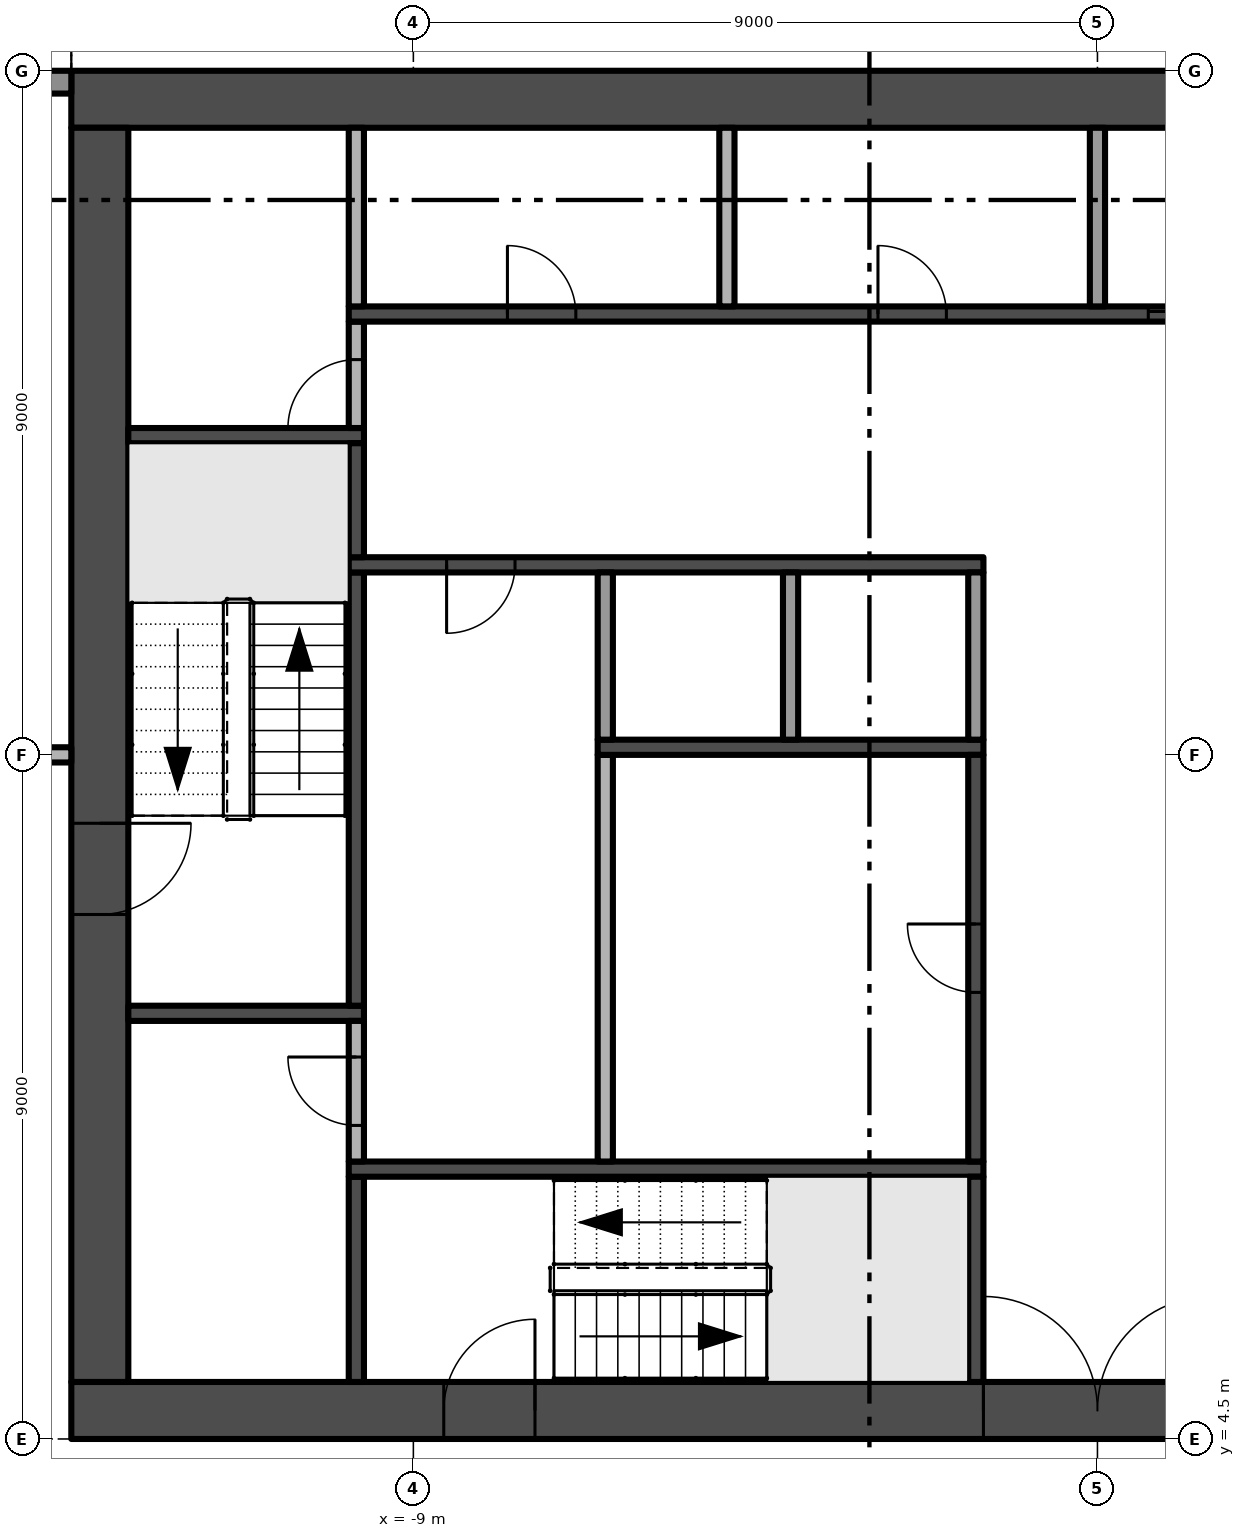
"""IFC4 building model, lengths in metres.
Left out: names, types, materials, properties, quantities, classifications, styles, units other than length and angle.
Written with IfcOpenShell. Run it as: python <this file> out.ifc"""

import sys

from ifc_helpers import new_model, si_unit, direction, frame, frame_2d, origin, place, context, subcontext, project, spatial, rectangle, extrude, element, fill, save


model = new_model("IFC4")
c1 = context("Model", 3, precision=1e-05, world=origin(), true_north=direction((0.0, 1.0)))
c2 = subcontext(c1, "Body", "Model", "MODEL_VIEW")
j1 = project(units=[si_unit("LENGTHUNIT", "METRE"), si_unit("PLANEANGLEUNIT", "RADIAN")], contexts=[c1])
p1 = place(None, origin())
s1 = spatial("IfcSite", under=j1, at=p1, CompositionType="ELEMENT")
p2 = place(p1, origin())
s2 = spatial("IfcBuilding", under=s1, at=p2, CompositionType="ELEMENT")
p3 = place(p2, frame((0.0, 0.0, 144.0)))
s3 = spatial("IfcBuildingStorey", under=s2, at=p3, CompositionType="ELEMENT", Elevation=144.0)
p4 = place(p3, frame((-13.5, 4.875, -0.3), z_axis=(0.0, 0.0, 1.0), x_axis=(1.0, 0.0, 0.0)))
e1 = element("IfcWall", 1, at=p4, inside=s3, PredefinedType="SHEAR", context=c2, shape_type="SweptSolid", body=[
    extrude(rectangle(XDim=27.0, YDim=0.75, at=frame_2d((13.5, 0.0))), origin(), (0.0, 0.0, 1.0), 3.8),
])
p5 = place(p4, frame((12.0, 0.0, 0.3)))
e2 = element("IfcOpeningElement", 2, at=p5, cuts=e1, PredefinedType="OPENING", context=c2, shape_type="SweptSolid", body=[
    extrude(rectangle(XDim=3.0, YDim=2.4, at=frame_2d((1.5, 1.2))), frame((0.0, 0.385, 0.0), z_axis=(0.0, -1.0, 0.0), x_axis=(1.0, 0.0, 0.0)), (0.0, 0.0, 1.0), 0.77),
])
p6 = place(p4, frame((4.9, 0.0, 0.3)))
e3 = element("IfcOpeningElement", 3, at=p6, cuts=e1, PredefinedType="OPENING", context=c2, shape_type="SweptSolid", body=[
    extrude(rectangle(XDim=1.2, YDim=2.2, at=frame_2d((0.6, 1.1))), frame((0.0, 0.385, 0.0), z_axis=(0.0, -1.0, 0.0), x_axis=(1.0, 0.0, 0.0)), (0.0, 0.0, 1.0), 0.77),
])
p7 = place(p4, frame((20.75, 0.0, 0.3)))
e4 = element("IfcOpeningElement", 4, at=p7, cuts=e1, PredefinedType="OPENING", context=c2, shape_type="SweptSolid", body=[
    extrude(rectangle(XDim=1.5, YDim=2.2, at=frame_2d((0.75, 1.1))), frame((0.0, 0.385, 0.0), z_axis=(0.0, -1.0, 0.0), x_axis=(1.0, 0.0, 0.0)), (0.0, 0.0, 1.0), 0.77),
])
p8 = place(p4, frame((17.4, 0.0, 0.3)))
e5 = element("IfcOpeningElement", 5, at=p8, cuts=e1, PredefinedType="OPENING", context=c2, shape_type="SweptSolid", body=[
    extrude(rectangle(XDim=1.2, YDim=2.2, at=frame_2d((0.6, 1.1))), frame((0.0, 0.385, 0.0), z_axis=(0.0, -1.0, 0.0), x_axis=(1.0, 0.0, 0.0)), (0.0, 0.0, 1.0), 0.77),
])
p9 = place(p3, frame((13.5, 22.125, -0.3), z_axis=(0.0, 0.0, 1.0), x_axis=(-1.0, 0.0, 0.0)))
e6 = element("IfcWall", 6, at=p9, inside=s3, PredefinedType="SHEAR", context=c2, shape_type="SweptSolid", body=[
    extrude(rectangle(XDim=27.0, YDim=0.75, at=frame_2d((13.5, 0.0))), origin(), (0.0, 0.0, 1.0), 3.8),
])
p10 = place(p3, frame((-13.125, 21.75, -0.3), z_axis=(0.0, 0.0, 1.0), x_axis=(0.0, -1.0, 0.0)))
e7 = element("IfcWall", 7, at=p10, inside=s3, PredefinedType="SHEAR", context=c2, shape_type="SweptSolid", body=[
    extrude(rectangle(XDim=16.5, YDim=0.75, at=frame_2d((8.25, 0.0))), origin(), (0.0, 0.0, 1.0), 3.8),
])
p11 = place(p10, frame((9.15, 0.0, 0.3)))
e8 = element("IfcOpeningElement", 8, at=p11, cuts=e7, PredefinedType="OPENING", context=c2, shape_type="SweptSolid", body=[
    extrude(rectangle(XDim=1.2, YDim=2.2, at=frame_2d((0.6, 1.1))), frame((0.0, 0.385, 0.0), z_axis=(0.0, -1.0, 0.0), x_axis=(1.0, 0.0, 0.0)), (0.0, 0.0, 1.0), 0.77),
])
p12 = place(p3, frame((-16.85, 22.35, 0.0), z_axis=(0.0, 0.0, 1.0), x_axis=(1.0, 0.0, 0.0)))
e9 = element("IfcWall", 9, at=p12, inside=s3, PredefinedType="SOLIDWALL", context=c2, shape_type="SweptSolid", body=[
    extrude(rectangle(XDim=3.35, YDim=0.3, at=frame_2d((1.675, 0.0))), origin(), (0.0, 0.0, 1.0), 3.5),
])
p13 = place(p12, frame((0.3, 0.0, 0.0)))
e10 = element("IfcOpeningElement", 10, at=p13, cuts=e9, PredefinedType="OPENING", context=c2, shape_type="SweptSolid", body=[
    extrude(rectangle(XDim=2.35, YDim=2.4, at=frame_2d((1.175, 1.2))), frame((0.0, 0.16, 0.0), z_axis=(0.0, -1.0, 0.0), x_axis=(1.0, 0.0, 0.0)), (0.0, 0.0, 1.0), 0.32),
])
for number, where, z_axis, x_axis in (
    (11, (-12.75, 10.1, 0.0), (0.0, 0.0, 1.0), (1.0, 0.0, 0.0)),
    (12, (-12.75, 17.7, 0.0), (0.0, 0.0, 1.0), (1.0, 0.0, 0.0)),
):
    element("IfcWall", number, at=place(p3, frame(where, z_axis=z_axis, x_axis=x_axis)), inside=s3, PredefinedType="SHEAR", context=c2, shape_type="SweptSolid", body=[
        extrude(rectangle(XDim=3.1, YDim=0.2, at=frame_2d((1.55, 0.0))), origin(), (0.0, 0.0, 1.0), 3.5),
    ])
p14 = place(p3, frame((-9.75, 5.25, 0.0), z_axis=(0.0, 0.0, 1.0), x_axis=(0.0, 1.0, 0.0)))
e13 = element("IfcWall", 13, at=p14, inside=s3, PredefinedType="SHEAR", context=c2, shape_type="SweptSolid", body=[
    extrude(rectangle(XDim=2.7, YDim=0.2, at=frame_2d((1.35, 0.0))), origin(), (0.0, 0.0, 1.0), 3.5),
])
p15 = place(p3, frame((-9.85, 8.05, 0.0), z_axis=(0.0, 0.0, 1.0), x_axis=(1.0, 0.0, 0.0)))
e14 = element("IfcWall", 14, at=p15, inside=s3, PredefinedType="SHEAR", context=c2, shape_type="SweptSolid", body=[
    extrude(rectangle(XDim=8.35, YDim=0.2, at=frame_2d((4.175, 0.0))), origin(), (0.0, 0.0, 1.0), 3.5),
])
p16 = place(p3, frame((-9.75, 8.15, 0.0), z_axis=(0.0, 0.0, 1.0), x_axis=(0.0, 1.0, 0.0)))
e15 = element("IfcWall", 15, at=p16, inside=s3, PredefinedType="PARTITIONING", context=c2, shape_type="SweptSolid", body=[
    extrude(rectangle(XDim=1.85, YDim=0.2, at=frame_2d((0.925, 0.0))), origin(), (0.0, 0.0, 1.0), 3.5),
])
p17 = place(p16, frame((0.475, 0.0, 0.0)))
e16 = element("IfcOpeningElement", 16, at=p17, cuts=e15, PredefinedType="OPENING", context=c2, shape_type="SweptSolid", body=[
    extrude(rectangle(XDim=0.9, YDim=2.1, at=frame_2d((0.45, 1.05))), frame((0.0, 0.11, 0.0), z_axis=(0.0, -1.0, 0.0), x_axis=(1.0, 0.0, 0.0)), (0.0, 0.0, 1.0), 0.22),
])
p18 = place(p3, frame((-9.75, 10.2, 0.0), z_axis=(0.0, 0.0, 1.0), x_axis=(0.0, 1.0, 0.0)))
e17 = element("IfcWall", 17, at=p18, inside=s3, PredefinedType="SHEAR", context=c2, shape_type="SweptSolid", body=[
    extrude(rectangle(XDim=5.7, YDim=0.2, at=frame_2d((2.85, 0.0))), origin(), (0.0, 0.0, 1.0), 3.5),
])
p19 = place(p3, frame((-1.5, 16.0, 0.0), z_axis=(0.0, 0.0, 1.0), x_axis=(-1.0, 0.0, 0.0)))
e18 = element("IfcWall", 18, at=p19, inside=s3, PredefinedType="SHEAR", context=c2, shape_type="SweptSolid", body=[
    extrude(rectangle(XDim=8.35, YDim=0.2, at=frame_2d((4.175, 0.0))), origin(), (0.0, 0.0, 1.0), 3.5),
])
p20 = place(p19, frame((6.162, 0.0, 0.0)))
e19 = element("IfcOpeningElement", 19, at=p20, cuts=e18, PredefinedType="OPENING", context=c2, shape_type="SweptSolid", body=[
    extrude(rectangle(XDim=0.9, YDim=2.1, at=frame_2d((0.45, 1.05))), frame((0.0, 0.11, 0.0), z_axis=(0.0, -1.0, 0.0), x_axis=(1.0, 0.0, 0.0)), (0.0, 0.0, 1.0), 0.22),
])
p21 = place(p3, frame((-9.75, 16.1, 0.0), z_axis=(0.0, 0.0, 1.0), x_axis=(0.0, 1.0, 0.0)))
e20 = element("IfcWall", 20, at=p21, inside=s3, PredefinedType="SHEAR", context=c2, shape_type="SweptSolid", body=[
    extrude(rectangle(XDim=1.5, YDim=0.2, at=frame_2d((0.75, 0.0))), origin(), (0.0, 0.0, 1.0), 3.5),
])
p22 = place(p3, frame((-9.75, 17.8, 0.0), z_axis=(0.0, 0.0, 1.0), x_axis=(0.0, 1.0, 0.0)))
e21 = element("IfcWall", 21, at=p22, inside=s3, PredefinedType="PARTITIONING", context=c2, shape_type="SweptSolid", body=[
    extrude(rectangle(XDim=1.4, YDim=0.2, at=frame_2d((0.7, 0.0))), origin(), (0.0, 0.0, 1.0), 3.5),
])
p23 = place(p22, origin())
e22 = element("IfcOpeningElement", 22, at=p23, cuts=e21, PredefinedType="OPENING", context=c2, shape_type="SweptSolid", body=[
    extrude(rectangle(XDim=0.9, YDim=2.1, at=frame_2d((0.45, 1.05))), frame((0.0, 0.11, 0.0), z_axis=(0.0, -1.0, 0.0), x_axis=(1.0, 0.0, 0.0)), (0.0, 0.0, 1.0), 0.22),
])
p24 = place(p3, frame((-9.85, 19.3, 0.0), z_axis=(0.0, 0.0, 1.0), x_axis=(1.0, 0.0, 0.0)))
e23 = element("IfcWall", 23, at=p24, inside=s3, PredefinedType="SHEAR", context=c2, shape_type="SweptSolid", body=[
    extrude(rectangle(XDim=19.7, YDim=0.2, at=frame_2d((9.85, 0.0))), origin(), (0.0, 0.0, 1.0), 3.5),
])
p25 = place(p24, frame((10.519, 0.0, 0.0)))
e24 = element("IfcOpeningElement", 24, at=p25, cuts=e23, PredefinedType="OPENING", context=c2, shape_type="SweptSolid", body=[
    extrude(rectangle(XDim=1.1, YDim=2.1, at=frame_2d((0.55, 1.05))), frame((0.0, 0.11, 0.0), z_axis=(0.0, -1.0, 0.0), x_axis=(1.0, 0.0, 0.0)), (0.0, 0.0, 1.0), 0.22),
])
p26 = place(p24, frame((12.956, 0.0, 0.0)))
e25 = element("IfcOpeningElement", 25, at=p26, cuts=e23, PredefinedType="OPENING", context=c2, shape_type="SweptSolid", body=[
    extrude(rectangle(XDim=1.1, YDim=2.1, at=frame_2d((0.55, 1.05))), frame((0.0, 0.11, 0.0), z_axis=(0.0, -1.0, 0.0), x_axis=(1.0, 0.0, 0.0)), (0.0, 0.0, 1.0), 0.22),
])
p27 = place(p24, frame((15.394, 0.0, 0.0)))
e26 = element("IfcOpeningElement", 26, at=p27, cuts=e23, PredefinedType="OPENING", context=c2, shape_type="SweptSolid", body=[
    extrude(rectangle(XDim=1.1, YDim=2.1, at=frame_2d((0.55, 1.05))), frame((0.0, 0.11, 0.0), z_axis=(0.0, -1.0, 0.0), x_axis=(1.0, 0.0, 0.0)), (0.0, 0.0, 1.0), 0.22),
])
p28 = place(p24, frame((17.831, 0.0, 0.0)))
e27 = element("IfcOpeningElement", 27, at=p28, cuts=e23, PredefinedType="OPENING", context=c2, shape_type="SweptSolid", body=[
    extrude(rectangle(XDim=1.1, YDim=2.1, at=frame_2d((0.55, 1.05))), frame((0.0, 0.11, 0.0), z_axis=(0.0, -1.0, 0.0), x_axis=(1.0, 0.0, 0.0)), (0.0, 0.0, 1.0), 0.22),
])
p29 = place(p24, frame((2.087, 0.0, 0.0)))
e28 = element("IfcOpeningElement", 28, at=p29, cuts=e23, PredefinedType="OPENING", context=c2, shape_type="SweptSolid", body=[
    extrude(rectangle(XDim=0.9, YDim=2.1, at=frame_2d((0.45, 1.05))), frame((0.0, 0.11, 0.0), z_axis=(0.0, -1.0, 0.0), x_axis=(1.0, 0.0, 0.0)), (0.0, 0.0, 1.0), 0.22),
])
p30 = place(p24, frame((6.963, 0.0, 0.0)))
e29 = element("IfcOpeningElement", 29, at=p30, cuts=e23, PredefinedType="OPENING", context=c2, shape_type="SweptSolid", body=[
    extrude(rectangle(XDim=0.9, YDim=2.1, at=frame_2d((0.45, 1.05))), frame((0.0, 0.11, 0.0), z_axis=(0.0, -1.0, 0.0), x_axis=(1.0, 0.0, 0.0)), (0.0, 0.0, 1.0), 0.22),
])
p31 = place(p3, frame((-9.75, 19.4, 0.0), z_axis=(0.0, 0.0, 1.0), x_axis=(0.0, 1.0, 0.0)))
e30 = element("IfcWall", 30, at=p31, inside=s3, PredefinedType="PARTITIONING", context=c2, shape_type="SweptSolid", body=[
    extrude(rectangle(XDim=2.35, YDim=0.2, at=frame_2d((1.175, 0.0))), origin(), (0.0, 0.0, 1.0), 3.5),
])
p32 = place(p3, frame((-6.475, 8.15, 0.0), z_axis=(0.0, 0.0, 1.0), x_axis=(0.0, 1.0, 0.0)))
e31 = element("IfcWall", 31, at=p32, inside=s3, PredefinedType="PARTITIONING", context=c2, shape_type="SweptSolid", body=[
    extrude(rectangle(XDim=5.35, YDim=0.2, at=frame_2d((2.675, 0.0))), origin(), (0.0, 0.0, 1.0), 3.5),
])
p33 = place(p3, frame((-6.575, 13.6, 0.0), z_axis=(0.0, 0.0, 1.0), x_axis=(1.0, 0.0, 0.0)))
e32 = element("IfcWall", 32, at=p33, inside=s3, PredefinedType="SHEAR", context=c2, shape_type="SweptSolid", body=[
    extrude(rectangle(XDim=5.075, YDim=0.2, at=frame_2d((2.538, 0.0))), origin(), (0.0, 0.0, 1.0), 3.5),
])
p34 = place(p3, frame((-6.475, 13.7, 0.0), z_axis=(0.0, 0.0, 1.0), x_axis=(0.0, 1.0, 0.0)))
e33 = element("IfcWall", 33, at=p34, inside=s3, PredefinedType="PARTITIONING", context=c2, shape_type="SweptSolid", body=[
    extrude(rectangle(XDim=2.2, YDim=0.2, at=frame_2d((1.1, 0.0))), origin(), (0.0, 0.0, 1.0), 3.5),
])
p35 = place(p3, frame((-4.875, 19.4, 0.0), z_axis=(0.0, 0.0, 1.0), x_axis=(0.0, 1.0, 0.0)))
e34 = element("IfcWall", 34, at=p35, inside=s3, PredefinedType="PARTITIONING", context=c2, shape_type="SweptSolid", body=[
    extrude(rectangle(XDim=2.35, YDim=0.2, at=frame_2d((1.175, 0.0))), origin(), (0.0, 0.0, 1.0), 3.5),
])
p36 = place(p3, frame((-4.037, 13.7, 0.0), z_axis=(0.0, 0.0, 1.0), x_axis=(0.0, 1.0, 0.0)))
e35 = element("IfcWall", 35, at=p36, inside=s3, PredefinedType="PARTITIONING", context=c2, shape_type="SweptSolid", body=[
    extrude(rectangle(XDim=2.2, YDim=0.2, at=frame_2d((1.1, 0.0))), origin(), (0.0, 0.0, 1.0), 3.5),
])
p37 = place(p3, frame((-1.6, 5.25, 0.0), z_axis=(0.0, 0.0, 1.0), x_axis=(0.0, 1.0, 0.0)))
e36 = element("IfcWall", 36, at=p37, inside=s3, PredefinedType="SHEAR", context=c2, shape_type="SweptSolid", body=[
    extrude(rectangle(XDim=2.7, YDim=0.2, at=frame_2d((1.35, 0.0))), origin(), (0.0, 0.0, 1.0), 3.5),
])
p38 = place(p3, frame((-1.6, 8.15, 0.0), z_axis=(0.0, 0.0, 1.0), x_axis=(0.0, 1.0, 0.0)))
e37 = element("IfcWall", 37, at=p38, inside=s3, PredefinedType="SHEAR", context=c2, shape_type="SweptSolid", body=[
    extrude(rectangle(XDim=5.35, YDim=0.2, at=frame_2d((2.675, 0.0))), origin(), (0.0, 0.0, 1.0), 3.5),
])
p39 = place(p38, frame((2.225, 0.0, 0.0)))
e38 = element("IfcOpeningElement", 38, at=p39, cuts=e37, PredefinedType="OPENING", context=c2, shape_type="SweptSolid", body=[
    extrude(rectangle(XDim=0.9, YDim=2.1, at=frame_2d((0.45, 1.05))), frame((0.0, 0.11, 0.0), z_axis=(0.0, -1.0, 0.0), x_axis=(1.0, 0.0, 0.0)), (0.0, 0.0, 1.0), 0.22),
])
p40 = place(p3, frame((-1.6, 13.7, 0.0), z_axis=(0.0, 0.0, 1.0), x_axis=(0.0, 1.0, 0.0)))
e39 = element("IfcWall", 39, at=p40, inside=s3, PredefinedType="PARTITIONING", context=c2, shape_type="SweptSolid", body=[
    extrude(rectangle(XDim=2.2, YDim=0.2, at=frame_2d((1.1, 0.0))), origin(), (0.0, 0.0, 1.0), 3.5),
])
p41 = place(p3, frame((0.0, 19.4, 0.0), z_axis=(0.0, 0.0, 1.0), x_axis=(0.0, 1.0, 0.0)))
e40 = element("IfcWall", 40, at=p41, inside=s3, PredefinedType="PARTITIONING", context=c2, shape_type="SweptSolid", body=[
    extrude(rectangle(XDim=2.35, YDim=0.2, at=frame_2d((1.175, 0.0))), origin(), (0.0, 0.0, 1.0), 3.5),
])
p42 = place(p3, frame((-17.375, 13.5, 0.0), z_axis=(0.0, 0.0, 1.0), x_axis=(1.0, 0.0, 0.0)))
e41 = element("IfcWall", 41, at=p42, inside=s3, PredefinedType="PARTITIONING", context=c2, shape_type="SweptSolid", body=[
    extrude(rectangle(XDim=3.875, YDim=0.2, at=frame_2d((1.938, 0.0))), origin(), (0.0, 0.0, 1.0), 3.5),
])
p43 = place(p42, frame((1.35, 0.0, 0.0)))
e42 = element("IfcOpeningElement", 42, at=p43, cuts=e41, PredefinedType="OPENING", context=c2, shape_type="SweptSolid", body=[
    extrude(rectangle(XDim=0.9, YDim=2.1, at=frame_2d((0.45, 1.05))), frame((0.0, 0.11, 0.0), z_axis=(0.0, -1.0, 0.0), x_axis=(1.0, 0.0, 0.0)), (0.0, 0.0, 1.0), 0.22),
])
p44 = place(p5, frame((3.0, 0.0, 0.0), z_axis=(0.0, 0.0, 1.0), x_axis=(-1.0, 0.0, 0.0)))
e43 = element("IfcDoor", 43, at=p44, inside=s3, OperationType="DOUBLE_DOOR_SINGLE_SWING", PredefinedType="DOOR", context=c2, shape_type="SweptSolid", body=[
    extrude(rectangle(XDim=3.0, YDim=2.4, at=frame_2d((1.5, 1.2))), frame((0.0, 0.025, 0.0), z_axis=(0.0, -1.0, 0.0), x_axis=(1.0, 0.0, 0.0)), (0.0, 0.0, 1.0), 0.05),
])
fill(e2, e43)
p45 = place(p11, frame((1.2, 0.0, 0.0), z_axis=(0.0, 0.0, 1.0), x_axis=(-1.0, 0.0, 0.0)))
e44 = element("IfcDoor", 44, at=p45, inside=s3, OperationType="SINGLE_SWING_RIGHT", PredefinedType="DOOR", context=c2, shape_type="SweptSolid", body=[
    extrude(rectangle(XDim=1.2, YDim=2.2, at=frame_2d((0.6, 1.1))), frame((0.0, 0.025, 0.0), z_axis=(0.0, -1.0, 0.0), x_axis=(1.0, 0.0, 0.0)), (0.0, 0.0, 1.0), 0.05),
])
fill(e8, e44)
p46 = place(p6, frame((1.2, 0.0, 0.0), z_axis=(0.0, 0.0, 1.0), x_axis=(-1.0, 0.0, 0.0)))
e45 = element("IfcDoor", 45, at=p46, inside=s3, OperationType="SINGLE_SWING_LEFT", PredefinedType="DOOR", context=c2, shape_type="SweptSolid", body=[
    extrude(rectangle(XDim=1.2, YDim=2.2, at=frame_2d((0.6, 1.1))), frame((0.0, 0.025, 0.0), z_axis=(0.0, -1.0, 0.0), x_axis=(1.0, 0.0, 0.0)), (0.0, 0.0, 1.0), 0.05),
])
fill(e3, e45)
p47 = place(p25, origin())
e46 = element("IfcDoor", 46, at=p47, inside=s3, OperationType="SLIDING_TO_RIGHT", PredefinedType="DOOR", context=c2, shape_type="SweptSolid", body=[
    extrude(rectangle(XDim=1.1, YDim=2.1, at=frame_2d((0.55, 1.05))), frame((0.0, 0.025, 0.0), z_axis=(0.0, -1.0, 0.0), x_axis=(1.0, 0.0, 0.0)), (0.0, 0.0, 1.0), 0.05),
])
fill(e24, e46)
p48 = place(p20, origin())
e47 = element("IfcDoor", 47, at=p48, inside=s3, OperationType="SINGLE_SWING_RIGHT", PredefinedType="DOOR", context=c2, shape_type="SweptSolid", body=[
    extrude(rectangle(XDim=0.9, YDim=2.1, at=frame_2d((0.45, 1.05))), frame((0.0, 0.025, 0.0), z_axis=(0.0, -1.0, 0.0), x_axis=(1.0, 0.0, 0.0)), (0.0, 0.0, 1.0), 0.05),
])
fill(e19, e47)
p49 = place(p39, origin())
e48 = element("IfcDoor", 48, at=p49, inside=s3, OperationType="SINGLE_SWING_RIGHT", PredefinedType="DOOR", context=c2, shape_type="SweptSolid", body=[
    extrude(rectangle(XDim=0.9, YDim=2.1, at=frame_2d((0.45, 1.05))), frame((0.0, 0.025, 0.0), z_axis=(0.0, -1.0, 0.0), x_axis=(1.0, 0.0, 0.0)), (0.0, 0.0, 1.0), 0.05),
])
fill(e38, e48)
p50 = place(p23, origin())
e49 = element("IfcDoor", 49, at=p50, inside=s3, OperationType="SINGLE_SWING_LEFT", PredefinedType="DOOR", context=c2, shape_type="SweptSolid", body=[
    extrude(rectangle(XDim=0.9, YDim=2.1, at=frame_2d((0.45, 1.05))), frame((0.0, 0.025, 0.0), z_axis=(0.0, -1.0, 0.0), x_axis=(1.0, 0.0, 0.0)), (0.0, 0.0, 1.0), 0.05),
])
fill(e22, e49)
p51 = place(p29, origin())
e50 = element("IfcDoor", 50, at=p51, inside=s3, OperationType="SINGLE_SWING_LEFT", PredefinedType="DOOR", context=c2, shape_type="SweptSolid", body=[
    extrude(rectangle(XDim=0.9, YDim=2.1, at=frame_2d((0.45, 1.05))), frame((0.0, 0.025, 0.0), z_axis=(0.0, -1.0, 0.0), x_axis=(1.0, 0.0, 0.0)), (0.0, 0.0, 1.0), 0.05),
])
fill(e28, e50)
p52 = place(p30, origin())
e51 = element("IfcDoor", 51, at=p52, inside=s3, OperationType="SINGLE_SWING_LEFT", PredefinedType="DOOR", context=c2, shape_type="SweptSolid", body=[
    extrude(rectangle(XDim=0.9, YDim=2.1, at=frame_2d((0.45, 1.05))), frame((0.0, 0.025, 0.0), z_axis=(0.0, -1.0, 0.0), x_axis=(1.0, 0.0, 0.0)), (0.0, 0.0, 1.0), 0.05),
])
fill(e29, e51)
p53 = place(p17, origin())
e52 = element("IfcDoor", 52, at=p53, inside=s3, OperationType="SINGLE_SWING_RIGHT", PredefinedType="DOOR", context=c2, shape_type="SweptSolid", body=[
    extrude(rectangle(XDim=0.9, YDim=2.1, at=frame_2d((0.45, 1.05))), frame((0.0, 0.025, 0.0), z_axis=(0.0, -1.0, 0.0), x_axis=(1.0, 0.0, 0.0)), (0.0, 0.0, 1.0), 0.05),
])
fill(e16, e52)
save(model, sys.argv[1])
